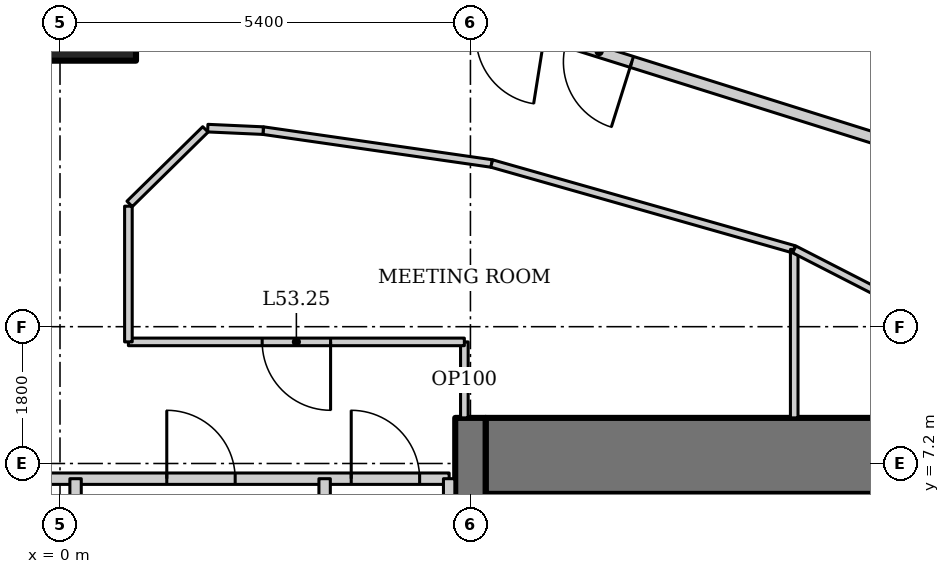
"""IFC4 building model, lengths in metres.
Left out: names, types, materials, properties, quantities, classifications, styles, units other than length and angle.
Written with IfcOpenShell. Run it as: python <this file> out.ifc"""

import sys

from ifc_helpers import new_model, si_unit, direction, frame, frame_2d, origin, origin_2d, place, context, subcontext, project, spatial, rectangle, hollow_rectangle, extrude, element, fill, save


model = new_model("IFC4")
c1 = context("Model", 3, precision=1e-05, world=origin(), true_north=direction((0.0, 1.0)))
c2 = subcontext(c1, "Body", "Model", "MODEL_VIEW")
j1 = project(units=[si_unit("LENGTHUNIT", "METRE"), si_unit("PLANEANGLEUNIT", "RADIAN")], contexts=[c1])
p1 = place(None, origin())
s1 = spatial("IfcSite", under=j1, at=p1, CompositionType="ELEMENT")
p2 = place(p1, origin())
s2 = spatial("IfcBuilding", under=s1, at=p2, CompositionType="ELEMENT")
p3 = place(p2, frame((0.0, 0.0, 228.4)))
s3 = spatial("IfcBuildingStorey", under=s2, at=p3, CompositionType="ELEMENT", Elevation=228.4)
p4 = place(p3, frame((0.0, 13.5, 0.0), z_axis=(0.0, 0.0, 1.0), x_axis=(1.0, 0.0, 0.0)))
e1 = element("IfcColumn", 1, at=p4, inside=s3, PredefinedType="COLUMN", context=c2, shape_type="SweptSolid", body=[
    extrude(hollow_rectangle(XDim=2.0, YDim=2.0, WallThickness=0.17, at=origin_2d()), origin(), (0.0, 0.0, 1.0), 4.2),
])
p5 = place(p3, frame((12.2, 7.3, 0.0), z_axis=(0.0, 0.0, 1.0), x_axis=(-1.0, 0.0, 0.0)))
e2 = element("IfcWall", 2, at=p5, inside=s3, PredefinedType="SHEAR", context=c2, shape_type="SweptSolid", body=[
    extrude(rectangle(XDim=6.6, YDim=1.0, at=frame_2d((3.3, 0.0))), origin(), (0.0, 0.0, 1.0), 4.2),
])
p6 = place(p3, frame((5.4, -6.8, 0.0), z_axis=(0.0, 0.0, 1.0), x_axis=(0.0, 1.0, 0.0)))
e3 = element("IfcWall", 3, at=p6, inside=s3, PredefinedType="SHEAR", context=c2, shape_type="SweptSolid", body=[
    extrude(rectangle(XDim=14.6, YDim=0.4, at=frame_2d((7.3, 0.0))), origin(), (0.0, 0.0, 1.0), 4.2),
])
p7 = place(p6, frame((5.9, 0.0, 0.0)))
e4 = element("IfcOpeningElement", 4, at=p7, cuts=e3, PredefinedType="OPENING", context=c2, shape_type="SweptSolid", body=[
    extrude(rectangle(XDim=1.8, YDim=2.1, at=frame_2d((0.9, 1.05))), frame((0.0, 0.21, 0.0), z_axis=(0.0, -1.0, 0.0), x_axis=(1.0, 0.0, 0.0)), (0.0, 0.0, 1.0), 0.42),
])
p8 = place(p3, frame((11.001, 11.392, 0.0), z_axis=(0.0, 0.0, 1.0), x_axis=(-0.954031103669, 0.299707612903, 0.0)))
e5 = element("IfcWall", 5, at=p8, inside=s3, PredefinedType="PARTITIONING", context=c2, shape_type="SweptSolid", body=[
    extrude(rectangle(XDim=4.695, YDim=0.15, at=frame_2d((2.348, 0.0))), origin(), (0.0, 0.0, 1.0), 4.05),
])
p9 = place(p8, frame((3.645, 0.0, 0.0)))
e6 = element("IfcOpeningElement", 6, at=p9, cuts=e5, PredefinedType="OPENING", context=c2, shape_type="SweptSolid", body=[
    extrude(rectangle(XDim=0.9, YDim=2.1, at=frame_2d((0.45, 1.05))), frame((0.0, 0.085, 0.0), z_axis=(0.0, -1.0, 0.0), x_axis=(1.0, 0.0, 0.0)), (0.0, 0.0, 1.0), 0.17),
])
p10 = place(p3, frame((-5.12, 7.0, 0.0), z_axis=(0.0, 0.0, 1.0), x_axis=(1.0, 0.0, 0.0)))
e7 = element("IfcWall", 7, at=p10, inside=s3, PredefinedType="SOLIDWALL", context=c2, shape_type="SweptSolid", body=[
    extrude(rectangle(XDim=10.24, YDim=0.15, at=frame_2d((5.12, 0.0))), origin(), (0.0, 0.0, 1.0), 4.05),
])
p11 = place(p10, frame((0.5, 0.0, 0.0)))
e8 = element("IfcOpeningElement", 8, at=p11, cuts=e7, PredefinedType="OPENING", context=c2, shape_type="SweptSolid", body=[
    extrude(rectangle(XDim=1.0, YDim=2.1, at=frame_2d((0.5, 1.05))), frame((0.0, 0.085, 0.0), z_axis=(0.0, -1.0, 0.0), x_axis=(1.0, 0.0, 0.0)), (0.0, 0.0, 1.0), 0.17),
])
p12 = place(p10, frame((3.248, 0.0, 0.0)))
e9 = element("IfcOpeningElement", 9, at=p12, cuts=e7, PredefinedType="OPENING", context=c2, shape_type="SweptSolid", body=[
    extrude(rectangle(XDim=0.9, YDim=2.1, at=frame_2d((0.45, 1.05))), frame((0.0, 0.085, 0.0), z_axis=(0.0, -1.0, 0.0), x_axis=(1.0, 0.0, 0.0)), (0.0, 0.0, 1.0), 0.17),
])
p13 = place(p10, frame((6.525, 0.0, 0.0)))
e10 = element("IfcOpeningElement", 10, at=p13, cuts=e7, PredefinedType="OPENING", context=c2, shape_type="SweptSolid", body=[
    extrude(rectangle(XDim=0.9, YDim=2.1, at=frame_2d((0.45, 1.05))), frame((0.0, 0.085, 0.0), z_axis=(0.0, -1.0, 0.0), x_axis=(1.0, 0.0, 0.0)), (0.0, 0.0, 1.0), 0.17),
])
p14 = place(p10, frame((8.952, 0.0, 0.0)))
e11 = element("IfcOpeningElement", 11, at=p14, cuts=e7, PredefinedType="OPENING", context=c2, shape_type="SweptSolid", body=[
    extrude(rectangle(XDim=0.9, YDim=2.1, at=frame_2d((0.45, 1.05))), frame((0.0, 0.085, 0.0), z_axis=(0.0, -1.0, 0.0), x_axis=(1.0, 0.0, 0.0)), (0.0, 0.0, 1.0), 0.17),
])
for number, where, z_axis, x_axis in (
    (12, (5.12, 2.6, 0.0), (0.0, 0.0, 1.0), (0.0, 1.0, 0.0)),
    (13, (0.205, 2.6, 0.0), (0.0, 0.0, 1.0), (0.0, 1.0, 0.0)),
    (14, (3.482, 2.6, 0.0), (0.0, 0.0, 1.0), (0.0, 1.0, 0.0)),
):
    element("IfcWall", number, at=place(p3, frame(where, z_axis=z_axis, x_axis=x_axis)), inside=s3, PredefinedType="SOLIDWALL", context=c2, shape_type="SweptSolid", body=[
        extrude(rectangle(XDim=4.4, YDim=0.15, at=frame_2d((2.2, 0.0))), origin(), (0.0, 0.0, 1.0), 4.05),
    ])
p15 = place(p3, frame((5.32, 7.8, 0.0), z_axis=(0.0, 0.0, 1.0), x_axis=(0.0, 1.0, 0.0)))
e15 = element("IfcWall", 15, at=p15, inside=s3, PredefinedType="PARTITIONING", context=c2, shape_type="SweptSolid", body=[
    extrude(rectangle(XDim=1.0, YDim=0.1, at=frame_2d((0.5, 0.0))), origin(), (0.0, 0.0, 1.0), 4.05),
])
p16 = place(p3, frame((5.32, 8.8, 0.0), z_axis=(0.0, 0.0, 1.0), x_axis=(-1.0, 0.0, 0.0)))
e16 = element("IfcWall", 16, at=p16, inside=s3, PredefinedType="PARTITIONING", context=c2, shape_type="SweptSolid", body=[
    extrude(rectangle(XDim=4.42, YDim=0.1, at=frame_2d((2.21, 0.0))), origin(), (0.0, 0.0, 1.0), 4.05),
])
p17 = place(p16, frame((1.76, 0.0, 0.0)))
e17 = element("IfcOpeningElement", 17, at=p17, cuts=e16, PredefinedType="OPENING", context=c2, shape_type="SweptSolid", body=[
    extrude(rectangle(XDim=0.9, YDim=2.1, at=frame_2d((0.45, 1.05))), frame((0.0, 0.06, 0.0), z_axis=(0.0, -1.0, 0.0), x_axis=(1.0, 0.0, 0.0)), (0.0, 0.0, 1.0), 0.12),
])
p18 = place(p3, frame((2.673, 11.58, 0.0), z_axis=(0.0, 0.0, 1.0), x_axis=(0.989805921373, -0.142422744025, 0.0)))
e18 = element("IfcWall", 18, at=p18, inside=s3, PredefinedType="PARTITIONING", context=c2, shape_type="SweptSolid", body=[
    extrude(rectangle(XDim=3.038, YDim=0.1, at=frame_2d((1.519, 0.0))), origin(), (0.0, 0.0, 1.0), 4.05),
])
p19 = place(p3, frame((5.68, 11.147, 0.0), z_axis=(0.0, 0.0, 1.0), x_axis=(0.961970251804, -0.27315423234, 0.0)))
e19 = element("IfcWall", 19, at=p19, inside=s3, PredefinedType="PARTITIONING", context=c2, shape_type="SweptSolid", body=[
    extrude(rectangle(XDim=4.137, YDim=0.1, at=frame_2d((2.069, 0.0))), origin(), (0.0, 0.0, 1.0), 4.05),
])
p20 = place(p3, frame((9.66, 10.017, 0.0), z_axis=(0.0, 0.0, 1.0), x_axis=(0.0, -1.0, 0.0)))
e20 = element("IfcWall", 20, at=p20, inside=s3, PredefinedType="PARTITIONING", context=c2, shape_type="SweptSolid", body=[
    extrude(rectangle(XDim=2.217, YDim=0.1, at=frame_2d((1.108, 0.0))), origin(), (0.0, 0.0, 1.0), 4.05),
])
p21 = place(p3, frame((0.9, 8.8, 0.0), z_axis=(0.0, 0.0, 1.0), x_axis=(0.0, 1.0, 0.0)))
e21 = element("IfcWall", 21, at=p21, inside=s3, PredefinedType="PARTITIONING", context=c2, shape_type="SweptSolid", body=[
    extrude(rectangle(XDim=1.785, YDim=0.1, at=frame_2d((0.893, 0.0))), origin(), (0.0, 0.0, 1.0), 4.05),
])
p22 = place(p3, frame((1.944, 11.613, 0.0), z_axis=(0.0, 0.0, 1.0), x_axis=(0.99899525873, -0.04481599085, 0.0)))
e22 = element("IfcWall", 22, at=p22, inside=s3, PredefinedType="PARTITIONING", context=c2, shape_type="SweptSolid", body=[
    extrude(rectangle(XDim=0.73, YDim=0.1, at=frame_2d((0.365, 0.0))), origin(), (0.0, 0.0, 1.0), 4.05),
])
p23 = place(p3, frame((1.913, 11.596, 0.0), z_axis=(0.0, 0.0, 1.0), x_axis=(-0.71318945388, -0.70097132814, 0.0)))
e23 = element("IfcWall", 23, at=p23, inside=s3, PredefinedType="PARTITIONING", context=c2, shape_type="SweptSolid", body=[
    extrude(rectangle(XDim=1.399, YDim=0.1, at=frame_2d((0.699, 0.0))), origin(), (0.0, 0.0, 1.0), 4.05),
])
p24 = place(p3, frame((9.66, 10.017, 0.0), z_axis=(0.0, 0.0, 1.0), x_axis=(0.889833724874, -0.456284935185, 0.0)))
e24 = element("IfcWall", 24, at=p24, inside=s3, PredefinedType="PARTITIONING", context=c2, shape_type="SweptSolid", body=[
    extrude(rectangle(XDim=4.22, YDim=0.1, at=frame_2d((2.11, 0.0))), origin(), (0.0, 0.0, 1.0), 4.05),
])
p25 = place(p13, origin())
e25 = element("IfcDoor", 25, at=p25, inside=s3, OperationType="SINGLE_SWING_LEFT", PredefinedType="DOOR", context=c2, shape_type="SweptSolid", body=[
    extrude(rectangle(XDim=0.9, YDim=2.1, at=frame_2d((0.45, 1.05))), frame((0.0, 0.025, 0.0), z_axis=(0.0, -1.0, 0.0), x_axis=(1.0, 0.0, 0.0)), (0.0, 0.0, 1.0), 0.05),
])
fill(e10, e25)
p26 = place(p14, origin())
e26 = element("IfcDoor", 26, at=p26, inside=s3, OperationType="SINGLE_SWING_LEFT", PredefinedType="DOOR", context=c2, shape_type="SweptSolid", body=[
    extrude(rectangle(XDim=0.9, YDim=2.1, at=frame_2d((0.45, 1.05))), frame((0.0, 0.025, 0.0), z_axis=(0.0, -1.0, 0.0), x_axis=(1.0, 0.0, 0.0)), (0.0, 0.0, 1.0), 0.05),
])
fill(e11, e26)
p27 = place(p17, origin())
e27 = element("IfcDoor", 27, at=p27, inside=s3, OperationType="SINGLE_SWING_LEFT", PredefinedType="DOOR", context=c2, shape_type="SweptSolid", body=[
    extrude(rectangle(XDim=0.9, YDim=2.1, at=frame_2d((0.45, 1.05))), frame((0.0, 0.025, 0.0), z_axis=(0.0, -1.0, 0.0), x_axis=(1.0, 0.0, 0.0)), (0.0, 0.0, 1.0), 0.05),
])
fill(e17, e27)
p28 = place(p9, origin())
e28 = element("IfcDoor", 28, at=p28, inside=s3, OperationType="SINGLE_SWING_LEFT", PredefinedType="DOOR", context=c2, shape_type="SweptSolid", body=[
    extrude(rectangle(XDim=0.9, YDim=2.1, at=frame_2d((0.45, 1.05))), frame((0.0, 0.025, 0.0), z_axis=(0.0, -1.0, 0.0), x_axis=(1.0, 0.0, 0.0)), (0.0, 0.0, 1.0), 0.05),
])
fill(e6, e28)
save(model, sys.argv[1])
